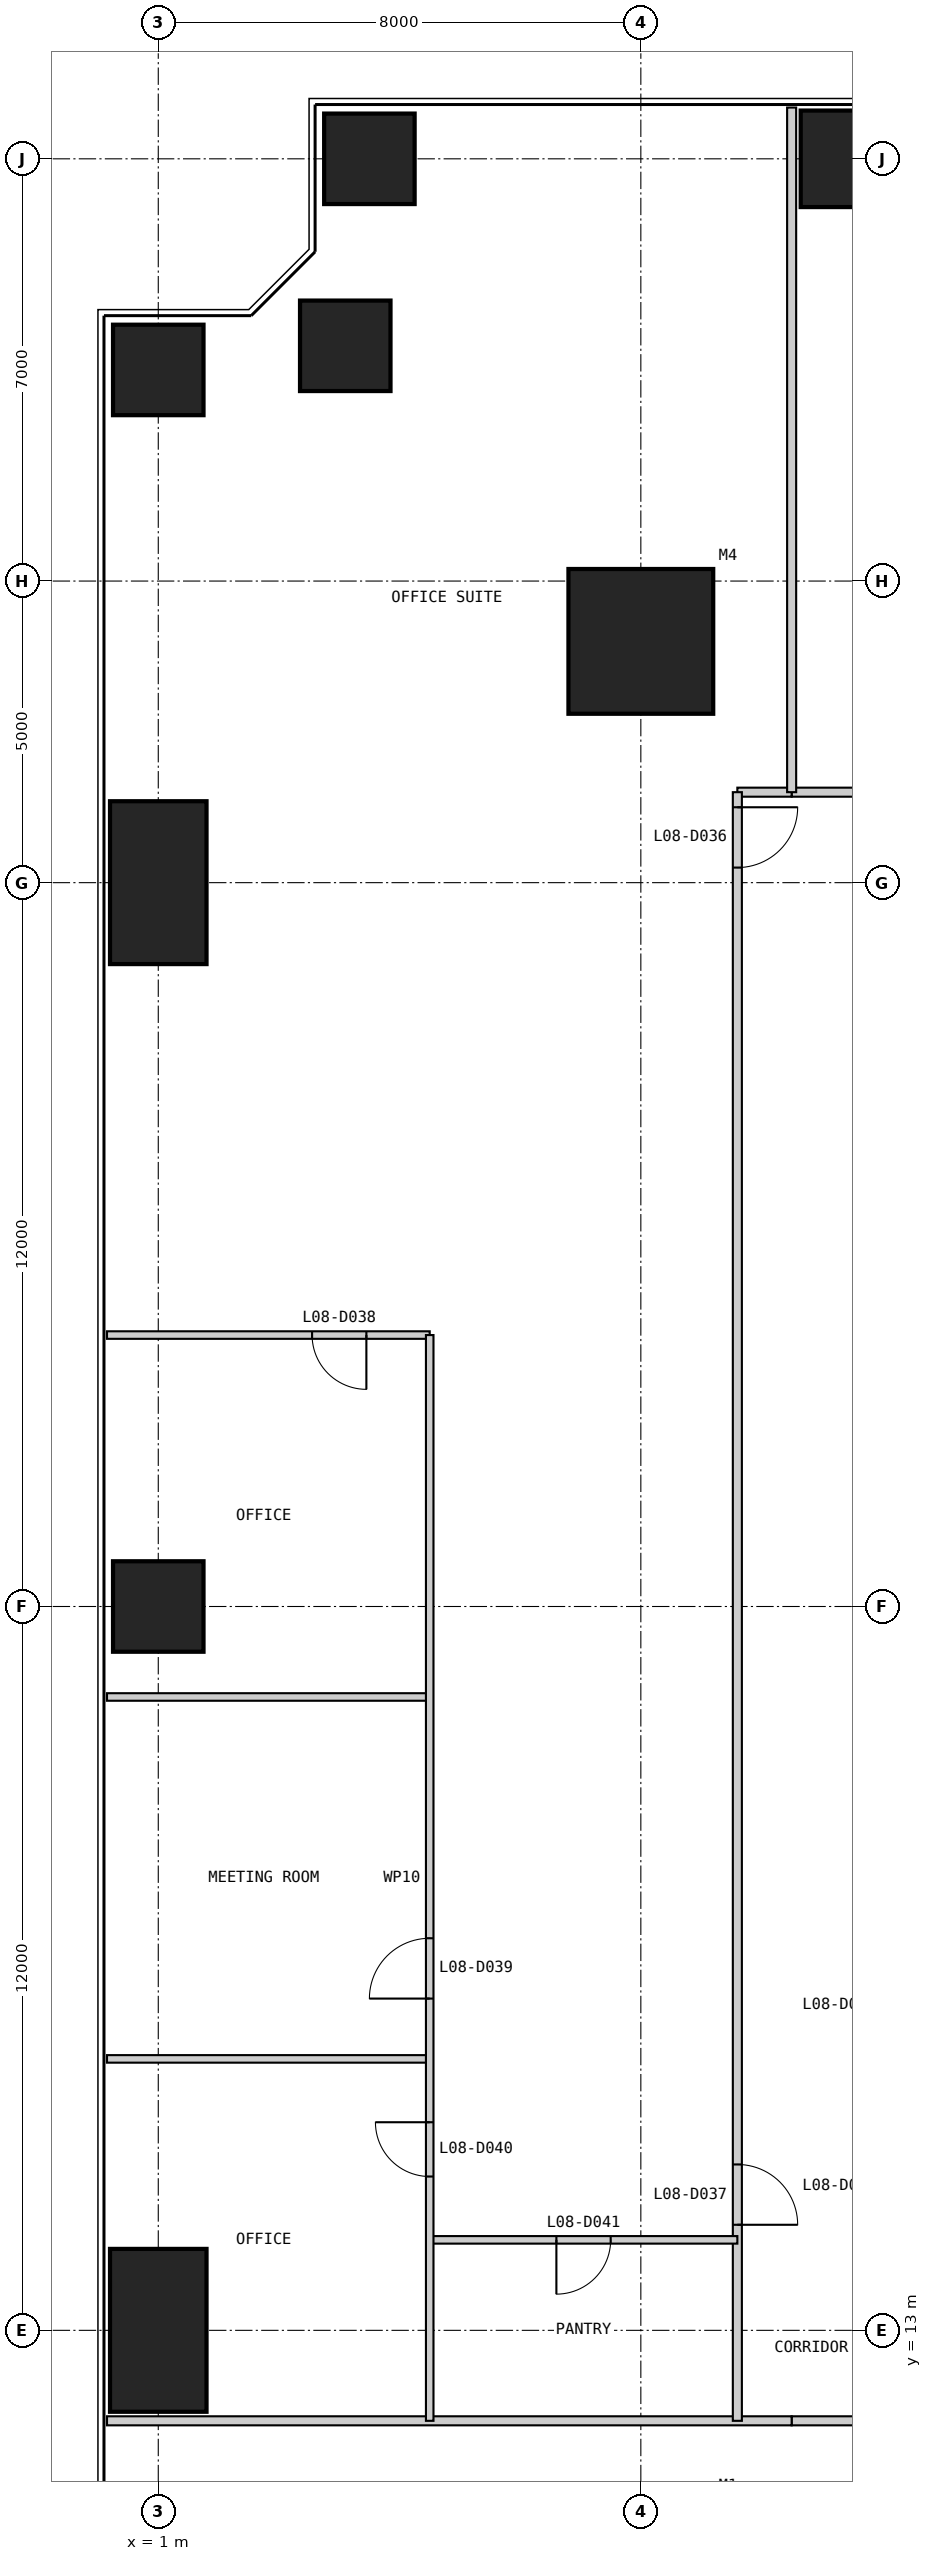
"""IFC4 building model, lengths in metres.
Left out: names, types, materials, properties, quantities, classifications, styles, units other than length and angle.
Written with IfcOpenShell. Run it as: python <this file> out.ifc"""

import sys

from ifc_helpers import new_model, si_unit, direction, frame, frame_2d, origin, origin_2d, place, context, subcontext, project, spatial, rectangle, extrude, element, fill, save


model = new_model("IFC4")
c1 = context("Model", 3, precision=1e-05, world=origin(), true_north=direction((0.0, 1.0)))
c2 = subcontext(c1, "Body", "Model", "MODEL_VIEW")
j1 = project(units=[si_unit("LENGTHUNIT", "METRE"), si_unit("PLANEANGLEUNIT", "RADIAN")], contexts=[c1])
p1 = place(None, origin())
s1 = spatial("IfcSite", under=j1, at=p1, CompositionType="ELEMENT")
p2 = place(p1, origin())
s2 = spatial("IfcBuilding", under=s1, at=p2, CompositionType="ELEMENT")
p3 = place(p2, frame((0.0, 0.0, 39.0)))
s3 = spatial("IfcBuildingStorey", under=s2, at=p3, CompositionType="ELEMENT", Elevation=39.0)
p4 = place(p3, frame((9.0, 41.0, 0.0), z_axis=(0.0, 0.0, 1.0), x_axis=(1.0, 0.0, 0.0)))
e1 = element("IfcColumn", 1, at=p4, inside=s3, PredefinedType="COLUMN", context=c2, shape_type="SweptSolid", body=[
    extrude(rectangle(XDim=2.4, YDim=2.4, at=origin_2d()), origin(), (0.0, 0.0, 1.0), 4.0),
])
p5 = place(p3, frame((13.0, 49.0, 0.0), z_axis=(0.0, 0.0, 1.0), x_axis=(1.0, 0.0, 0.0)))
e2 = element("IfcColumn", 2, at=p5, inside=s3, PredefinedType="COLUMN", context=c2, shape_type="SweptSolid", body=[
    extrude(rectangle(XDim=2.7, YDim=1.6, at=origin_2d()), origin(), (0.0, 0.0, 1.0), 4.0),
])
for number, where, z_axis, x_axis in (
    (3, (4.5, 49.0, 0.0), (0.0, 0.0, 1.0), (1.0, 0.0, 0.0)),
    (4, (4.1, 45.9, 0.0), (0.0, 0.0, 1.0), (1.0, 0.0, 0.0)),
    (5, (1.0, 45.5, 0.0), (0.0, 0.0, 1.0), (1.0, 0.0, 0.0)),
):
    element("IfcColumn", number, at=place(p3, frame(where, z_axis=z_axis, x_axis=x_axis)), inside=s3, PredefinedType="COLUMN", context=c2, shape_type="SweptSolid", body=[
        extrude(rectangle(XDim=1.5, YDim=1.5, at=origin_2d()), origin(), (0.0, 0.0, 1.0), 4.0),
    ])
p6 = place(p3, frame((1.0, 37.0, 0.0), z_axis=(0.0, 0.0, 1.0), x_axis=(1.0, 0.0, 0.0)))
e6 = element("IfcColumn", 6, at=p6, inside=s3, PredefinedType="COLUMN", context=c2, shape_type="SweptSolid", body=[
    extrude(rectangle(XDim=1.6, YDim=2.7, at=origin_2d()), origin(), (0.0, 0.0, 1.0), 4.0),
])
p7 = place(p3, frame((1.0, 25.0, 0.0), z_axis=(0.0, 0.0, 1.0), x_axis=(1.0, 0.0, 0.0)))
e7 = element("IfcColumn", 7, at=p7, inside=s3, PredefinedType="COLUMN", context=c2, shape_type="SweptSolid", body=[
    extrude(rectangle(XDim=1.5, YDim=1.5, at=origin_2d()), origin(), (0.0, 0.0, 1.0), 4.0),
])
p8 = place(p3, frame((1.0, 13.0, 0.0), z_axis=(0.0, 0.0, 1.0), x_axis=(1.0, 0.0, 0.0)))
e8 = element("IfcColumn", 8, at=p8, inside=s3, PredefinedType="COLUMN", context=c2, shape_type="SweptSolid", body=[
    extrude(rectangle(XDim=1.6, YDim=2.7, at=origin_2d()), origin(), (0.0, 0.0, 1.0), 4.0),
])
p9 = place(p3, frame((11.5, 11.5, 0.0), z_axis=(0.0, 0.0, 1.0), x_axis=(1.0, 0.0, 0.0)))
e9 = element("IfcWall", 9, at=p9, inside=s3, PredefinedType="PARTITIONING", context=c2, shape_type="SweptSolid", body=[
    extrude(rectangle(XDim=27.0, YDim=0.15, at=frame_2d((13.5, 0.0))), origin(), (0.0, 0.0, 1.0), 3.85),
])
p10 = place(p9, frame((4.0, 0.0, 0.0)))
e10 = element("IfcOpeningElement", 10, at=p10, cuts=e9, PredefinedType="OPENING", context=c2, shape_type="SweptSolid", body=[
    extrude(rectangle(XDim=1.0, YDim=2.2, at=frame_2d((0.5, 1.1))), frame((0.0, 0.085, 0.0), z_axis=(0.0, -1.0, 0.0), x_axis=(1.0, 0.0, 0.0)), (0.0, 0.0, 1.0), 0.17),
])
p11 = place(p9, frame((10.0, 0.0, 0.0)))
e11 = element("IfcOpeningElement", 11, at=p11, cuts=e9, PredefinedType="OPENING", context=c2, shape_type="SweptSolid", body=[
    extrude(rectangle(XDim=1.0, YDim=2.2, at=frame_2d((0.5, 1.1))), frame((0.0, 0.085, 0.0), z_axis=(0.0, -1.0, 0.0), x_axis=(1.0, 0.0, 0.0)), (0.0, 0.0, 1.0), 0.17),
])
p12 = place(p9, frame((17.5, 0.0, 0.0)))
e12 = element("IfcOpeningElement", 12, at=p12, cuts=e9, PredefinedType="OPENING", context=c2, shape_type="SweptSolid", body=[
    extrude(rectangle(XDim=1.0, YDim=2.2, at=frame_2d((0.5, 1.1))), frame((0.0, 0.085, 0.0), z_axis=(0.0, -1.0, 0.0), x_axis=(1.0, 0.0, 0.0)), (0.0, 0.0, 1.0), 0.17),
])
p13 = place(p9, frame((23.5, 0.0, 0.0)))
e13 = element("IfcOpeningElement", 13, at=p13, cuts=e9, PredefinedType="OPENING", context=c2, shape_type="SweptSolid", body=[
    extrude(rectangle(XDim=1.0, YDim=2.2, at=frame_2d((0.5, 1.1))), frame((0.0, 0.085, 0.0), z_axis=(0.0, -1.0, 0.0), x_axis=(1.0, 0.0, 0.0)), (0.0, 0.0, 1.0), 0.17),
])
p14 = place(p3, frame((0.15, 11.5, 0.0), z_axis=(0.0, 0.0, 1.0), x_axis=(1.0, 0.0, 0.0)))
e14 = element("IfcWall", 14, at=p14, inside=s3, PredefinedType="PARTITIONING", context=c2, shape_type="SweptSolid", body=[
    extrude(rectangle(XDim=11.35, YDim=0.15, at=frame_2d((5.675, 0.0))), origin(), (0.0, 0.0, 1.0), 3.85),
])
p15 = place(p3, frame((38.5, 38.5, 0.0), z_axis=(0.0, 0.0, 1.0), x_axis=(-1.0, 0.0, 0.0)))
e15 = element("IfcWall", 15, at=p15, inside=s3, PredefinedType="PARTITIONING", context=c2, shape_type="SweptSolid", body=[
    extrude(rectangle(XDim=27.0, YDim=0.15, at=frame_2d((13.5, 0.0))), origin(), (0.0, 0.0, 1.0), 3.85),
])
p16 = place(p15, frame((2.5, 0.0, 0.0)))
e16 = element("IfcOpeningElement", 16, at=p16, cuts=e15, PredefinedType="OPENING", context=c2, shape_type="SweptSolid", body=[
    extrude(rectangle(XDim=1.0, YDim=2.2, at=frame_2d((0.5, 1.1))), frame((0.0, 0.085, 0.0), z_axis=(0.0, -1.0, 0.0), x_axis=(1.0, 0.0, 0.0)), (0.0, 0.0, 1.0), 0.17),
])
p17 = place(p15, frame((13.0, 0.0, 0.0)))
e17 = element("IfcOpeningElement", 17, at=p17, cuts=e15, PredefinedType="OPENING", context=c2, shape_type="SweptSolid", body=[
    extrude(rectangle(XDim=1.0, YDim=2.2, at=frame_2d((0.5, 1.1))), frame((0.0, 0.085, 0.0), z_axis=(0.0, -1.0, 0.0), x_axis=(1.0, 0.0, 0.0)), (0.0, 0.0, 1.0), 0.17),
])
p18 = place(p15, frame((23.5, 0.0, 0.0)))
e18 = element("IfcOpeningElement", 18, at=p18, cuts=e15, PredefinedType="OPENING", context=c2, shape_type="SweptSolid", body=[
    extrude(rectangle(XDim=1.0, YDim=2.2, at=frame_2d((0.5, 1.1))), frame((0.0, 0.085, 0.0), z_axis=(0.0, -1.0, 0.0), x_axis=(1.0, 0.0, 0.0)), (0.0, 0.0, 1.0), 0.17),
])
p19 = place(p3, frame((11.5, 38.5, 0.0), z_axis=(0.0, 0.0, 1.0), x_axis=(-1.0, 0.0, 0.0)))
e19 = element("IfcWall", 19, at=p19, inside=s3, PredefinedType="PARTITIONING", context=c2, shape_type="SweptSolid", body=[
    extrude(rectangle(XDim=0.9, YDim=0.15, at=frame_2d((0.45, 0.0))), origin(), (0.0, 0.0, 1.0), 3.85),
])
p20 = place(p3, frame((10.6, 38.5, 0.0), z_axis=(0.0, 0.0, 1.0), x_axis=(0.0, -1.0, 0.0)))
e20 = element("IfcWall", 20, at=p20, inside=s3, PredefinedType="PARTITIONING", context=c2, shape_type="SweptSolid", body=[
    extrude(rectangle(XDim=27.0, YDim=0.15, at=frame_2d((13.5, 0.0))), origin(), (0.0, 0.0, 1.0), 3.85),
])
p21 = place(p20, frame((0.25, 0.0, 0.0)))
e21 = element("IfcOpeningElement", 21, at=p21, cuts=e20, PredefinedType="OPENING", context=c2, shape_type="SweptSolid", body=[
    extrude(rectangle(XDim=1.0, YDim=2.2, at=frame_2d((0.5, 1.1))), frame((0.0, 0.085, 0.0), z_axis=(0.0, -1.0, 0.0), x_axis=(1.0, 0.0, 0.0)), (0.0, 0.0, 1.0), 0.17),
])
p22 = place(p20, frame((22.75, 0.0, 0.0)))
e22 = element("IfcOpeningElement", 22, at=p22, cuts=e20, PredefinedType="OPENING", context=c2, shape_type="SweptSolid", body=[
    extrude(rectangle(XDim=1.0, YDim=2.2, at=frame_2d((0.5, 1.1))), frame((0.0, 0.085, 0.0), z_axis=(0.0, -1.0, 0.0), x_axis=(1.0, 0.0, 0.0)), (0.0, 0.0, 1.0), 0.17),
])
p23 = place(p3, frame((11.5, 49.85, 0.0), z_axis=(0.0, 0.0, 1.0), x_axis=(0.0, -1.0, 0.0)))
e23 = element("IfcWall", 23, at=p23, inside=s3, PredefinedType="PARTITIONING", context=c2, shape_type="SweptSolid", body=[
    extrude(rectangle(XDim=11.35, YDim=0.15, at=frame_2d((5.675, 0.0))), origin(), (0.0, 0.0, 1.0), 3.85),
])
p24 = place(p3, frame((0.15, 29.5, 0.0), z_axis=(0.0, 0.0, 1.0), x_axis=(1.0, 0.0, 0.0)))
e24 = element("IfcWall", 24, at=p24, inside=s3, PredefinedType="PARTITIONING", context=c2, shape_type="SweptSolid", body=[
    extrude(rectangle(XDim=5.35, YDim=0.125, at=frame_2d((2.675, 0.0))), origin(), (0.0, 0.0, 1.0), 3.85),
])
p25 = place(p24, frame((3.4, 0.0, 0.0)))
e25 = element("IfcOpeningElement", 25, at=p25, cuts=e24, PredefinedType="OPENING", context=c2, shape_type="SweptSolid", body=[
    extrude(rectangle(XDim=0.9, YDim=2.2, at=frame_2d((0.45, 1.1))), frame((0.0, 0.073, 0.0), z_axis=(0.0, -1.0, 0.0), x_axis=(1.0, 0.0, 0.0)), (0.0, 0.0, 1.0), 0.145),
])
for number, where, z_axis, x_axis in (
    (26, (0.15, 23.5, 0.0), (0.0, 0.0, 1.0), (1.0, 0.0, 0.0)),
    (27, (0.15, 17.5, 0.0), (0.0, 0.0, 1.0), (1.0, 0.0, 0.0)),
):
    element("IfcWall", number, at=place(p3, frame(where, z_axis=z_axis, x_axis=x_axis)), inside=s3, PredefinedType="PARTITIONING", context=c2, shape_type="SweptSolid", body=[
        extrude(rectangle(XDim=5.35, YDim=0.125, at=frame_2d((2.675, 0.0))), origin(), (0.0, 0.0, 1.0), 3.85),
    ])
p26 = place(p3, frame((5.5, 14.5, 0.0), z_axis=(0.0, 0.0, 1.0), x_axis=(1.0, 0.0, 0.0)))
e28 = element("IfcWall", 28, at=p26, inside=s3, PredefinedType="PARTITIONING", context=c2, shape_type="SweptSolid", body=[
    extrude(rectangle(XDim=5.1, YDim=0.125, at=frame_2d((2.55, 0.0))), origin(), (0.0, 0.0, 1.0), 3.85),
])
p27 = place(p26, frame((2.1, 0.0, 0.0)))
e29 = element("IfcOpeningElement", 29, at=p27, cuts=e28, PredefinedType="OPENING", context=c2, shape_type="SweptSolid", body=[
    extrude(rectangle(XDim=0.9, YDim=2.2, at=frame_2d((0.45, 1.1))), frame((0.0, 0.073, 0.0), z_axis=(0.0, -1.0, 0.0), x_axis=(1.0, 0.0, 0.0)), (0.0, 0.0, 1.0), 0.145),
])
p28 = place(p3, frame((5.5, 29.5, 0.0), z_axis=(0.0, 0.0, 1.0), x_axis=(0.0, -1.0, 0.0)))
e30 = element("IfcWall", 30, at=p28, inside=s3, PredefinedType="PARTITIONING", context=c2, shape_type="SweptSolid", body=[
    extrude(rectangle(XDim=18.0, YDim=0.125, at=frame_2d((9.0, 0.0))), origin(), (0.0, 0.0, 1.0), 3.85),
])
p29 = place(p28, frame((10.0, 0.0, 0.0)))
e31 = element("IfcOpeningElement", 31, at=p29, cuts=e30, PredefinedType="OPENING", context=c2, shape_type="SweptSolid", body=[
    extrude(rectangle(XDim=1.0, YDim=2.2, at=frame_2d((0.5, 1.1))), frame((0.0, 0.073, 0.0), z_axis=(0.0, -1.0, 0.0), x_axis=(1.0, 0.0, 0.0)), (0.0, 0.0, 1.0), 0.145),
])
p30 = place(p28, frame((13.05, 0.0, 0.0)))
e32 = element("IfcOpeningElement", 32, at=p30, cuts=e30, PredefinedType="OPENING", context=c2, shape_type="SweptSolid", body=[
    extrude(rectangle(XDim=0.9, YDim=2.2, at=frame_2d((0.45, 1.1))), frame((0.0, 0.073, 0.0), z_axis=(0.0, -1.0, 0.0), x_axis=(1.0, 0.0, 0.0)), (0.0, 0.0, 1.0), 0.145),
])
p31 = place(p21, origin())
e33 = element("IfcDoor", 33, at=p31, inside=s3, OperationType="SINGLE_SWING_LEFT", PredefinedType="DOOR", context=c2, shape_type="SweptSolid", body=[
    extrude(rectangle(XDim=1.0, YDim=2.2, at=frame_2d((0.5, 1.1))), frame((0.0, 0.025, 0.0), z_axis=(0.0, -1.0, 0.0), x_axis=(1.0, 0.0, 0.0)), (0.0, 0.0, 1.0), 0.05),
])
fill(e21, e33)
p32 = place(p22, origin())
e34 = element("IfcDoor", 34, at=p32, inside=s3, OperationType="SINGLE_SWING_RIGHT", PredefinedType="DOOR", context=c2, shape_type="SweptSolid", body=[
    extrude(rectangle(XDim=1.0, YDim=2.2, at=frame_2d((0.5, 1.1))), frame((0.0, 0.025, 0.0), z_axis=(0.0, -1.0, 0.0), x_axis=(1.0, 0.0, 0.0)), (0.0, 0.0, 1.0), 0.05),
])
fill(e22, e34)
p33 = place(p25, frame((0.9, 0.0, 0.0), z_axis=(0.0, 0.0, 1.0), x_axis=(-1.0, 0.0, 0.0)))
e35 = element("IfcDoor", 35, at=p33, inside=s3, OperationType="SINGLE_SWING_LEFT", PredefinedType="DOOR", context=c2, shape_type="SweptSolid", body=[
    extrude(rectangle(XDim=0.9, YDim=2.2, at=frame_2d((0.45, 1.1))), frame((0.0, 0.025, 0.0), z_axis=(0.0, -1.0, 0.0), x_axis=(1.0, 0.0, 0.0)), (0.0, 0.0, 1.0), 0.05),
])
fill(e25, e35)
p34 = place(p29, frame((1.0, 0.0, 0.0), z_axis=(0.0, 0.0, 1.0), x_axis=(-1.0, 0.0, 0.0)))
e36 = element("IfcDoor", 36, at=p34, inside=s3, OperationType="SINGLE_SWING_LEFT", PredefinedType="DOOR", context=c2, shape_type="SweptSolid", body=[
    extrude(rectangle(XDim=1.0, YDim=2.2, at=frame_2d((0.5, 1.1))), frame((0.0, 0.025, 0.0), z_axis=(0.0, -1.0, 0.0), x_axis=(1.0, 0.0, 0.0)), (0.0, 0.0, 1.0), 0.05),
])
fill(e31, e36)
p35 = place(p30, frame((0.9, 0.0, 0.0), z_axis=(0.0, 0.0, 1.0), x_axis=(-1.0, 0.0, 0.0)))
e37 = element("IfcDoor", 37, at=p35, inside=s3, OperationType="SINGLE_SWING_RIGHT", PredefinedType="DOOR", context=c2, shape_type="SweptSolid", body=[
    extrude(rectangle(XDim=0.9, YDim=2.2, at=frame_2d((0.45, 1.1))), frame((0.0, 0.025, 0.0), z_axis=(0.0, -1.0, 0.0), x_axis=(1.0, 0.0, 0.0)), (0.0, 0.0, 1.0), 0.05),
])
fill(e32, e37)
p36 = place(p27, frame((0.9, 0.0, 0.0), z_axis=(0.0, 0.0, 1.0), x_axis=(-1.0, 0.0, 0.0)))
e38 = element("IfcDoor", 38, at=p36, inside=s3, OperationType="SINGLE_SWING_RIGHT", PredefinedType="DOOR", context=c2, shape_type="SweptSolid", body=[
    extrude(rectangle(XDim=0.9, YDim=2.2, at=frame_2d((0.45, 1.1))), frame((0.0, 0.025, 0.0), z_axis=(0.0, -1.0, 0.0), x_axis=(1.0, 0.0, 0.0)), (0.0, 0.0, 1.0), 0.05),
])
fill(e29, e38)
save(model, sys.argv[1])
